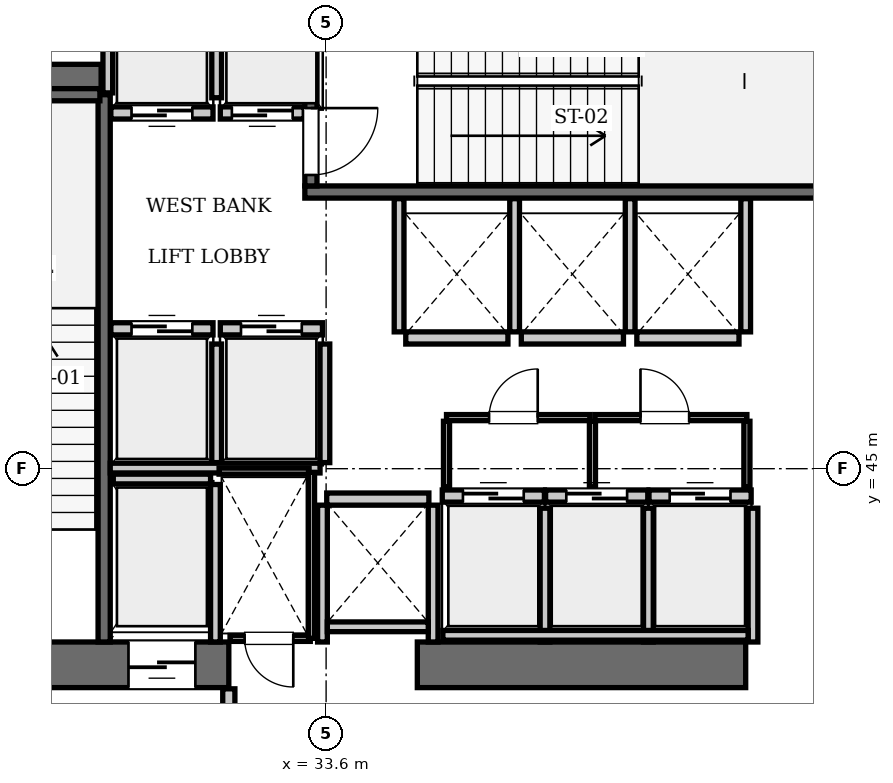
"""IFC4 building model, lengths in metres.
Left out: names, types, materials, properties, quantities, classifications, styles, units other than length and angle.
Written with IfcOpenShell. Run it as: python <this file> out.ifc"""

import sys

from ifc_helpers import new_model, si_unit, direction, frame, frame_2d, origin, place, context, subcontext, project, spatial, rectangle, extrude, element, fill, save


model = new_model("IFC4")
c1 = context("Model", 3, precision=1e-05, world=origin(), true_north=direction((0.0, 1.0)))
c2 = subcontext(c1, "Body", "Model", "MODEL_VIEW")
j1 = project(units=[si_unit("LENGTHUNIT", "METRE"), si_unit("PLANEANGLEUNIT", "RADIAN")], contexts=[c1])
p1 = place(None, origin())
s1 = spatial("IfcSite", under=j1, at=p1, CompositionType="ELEMENT")
p2 = place(p1, origin())
s2 = spatial("IfcBuilding", under=s1, at=p2, CompositionType="ELEMENT")
p3 = place(p2, frame((0.0, 0.0, 122.5)))
s3 = spatial("IfcBuildingStorey", under=s2, at=p3, CompositionType="ELEMENT", Elevation=122.5)
p4 = place(p3, frame((25.2, 41.775, 0.0), z_axis=(0.0, 0.0, 1.0), x_axis=(1.0, 0.0, 0.0)))
e1 = element("IfcWall", 1, at=p4, inside=s3, PredefinedType="SHEAR", context=c2, shape_type="SweptSolid", body=[
    extrude(rectangle(XDim=6.8, YDim=0.75, at=frame_2d((3.4, 0.0))), origin(), (0.0, 0.0, 1.0), 4.9),
])
p5 = place(p4, frame((1.65, 0.0, 0.0)))
e2 = element("IfcOpeningElement", 2, at=p5, cuts=e1, PredefinedType="OPENING", context=c2, shape_type="SweptSolid", body=[
    extrude(rectangle(XDim=1.15, YDim=2.15, at=frame_2d((0.575, 1.075))), frame((0.0, 0.385, 0.0), z_axis=(0.0, -1.0, 0.0), x_axis=(1.0, 0.0, 0.0)), (0.0, 0.0, 1.0), 0.77),
])
p6 = place(p4, frame((5.15, 0.0, 0.0)))
e3 = element("IfcOpeningElement", 3, at=p6, cuts=e1, PredefinedType="OPENING", context=c2, shape_type="SweptSolid", body=[
    extrude(rectangle(XDim=1.1, YDim=2.2, at=frame_2d((0.55, 1.1))), frame((0.0, 0.385, 0.0), z_axis=(0.0, -1.0, 0.0), x_axis=(1.0, 0.0, 0.0)), (0.0, 0.0, 1.0), 0.77),
])
p7 = place(p3, frame((35.1, 41.775, 0.0), z_axis=(0.0, 0.0, 1.0), x_axis=(1.0, 0.0, 0.0)))
e4 = element("IfcWall", 4, at=p7, inside=s3, PredefinedType="SHEAR", context=c2, shape_type="SweptSolid", body=[
    extrude(rectangle(XDim=5.4, YDim=0.75, at=frame_2d((2.7, 0.0))), origin(), (0.0, 0.0, 1.0), 4.9),
])
p8 = place(p3, frame((25.95, 51.4, 0.0), z_axis=(0.0, 0.0, 1.0), x_axis=(1.0, 0.0, 0.0)))
e5 = element("IfcWall", 5, at=p8, inside=s3, PredefinedType="SHEAR", context=c2, shape_type="SweptSolid", body=[
    extrude(rectangle(XDim=3.95, YDim=0.5, at=frame_2d((1.975, 0.0))), origin(), (0.0, 0.0, 1.0), 4.9),
])
p9 = place(p3, frame((29.95, 42.15, 0.0), z_axis=(0.0, 0.0, 1.0), x_axis=(0.0, 1.0, 0.0)))
e6 = element("IfcWall", 6, at=p9, inside=s3, PredefinedType="SOLIDWALL", context=c2, shape_type="SweptSolid", body=[
    extrude(rectangle(XDim=9.0, YDim=0.2, at=frame_2d((4.5, 0.0))), origin(), (0.0, 0.0, 1.0), 4.66),
])
p10 = place(p3, frame((26.38, 51.15, 0.0), z_axis=(0.0, 0.0, 1.0), x_axis=(1.0, 0.0, 0.0)))
e7 = element("IfcWall", 7, at=p10, inside=s3, PredefinedType="SOLIDWALL", context=c2, shape_type="SweptSolid", body=[
    extrude(rectangle(XDim=3.5, YDim=0.2, at=frame_2d((1.75, 0.0))), origin(), (0.0, 0.0, 1.0), 4.66),
])
p11 = place(p3, frame((33.25, 49.55, 0.0), z_axis=(0.0, 0.0, 1.0), x_axis=(1.0, 0.0, 0.0)))
e8 = element("IfcWall", 8, at=p11, inside=s3, PredefinedType="SOLIDWALL", context=c2, shape_type="SweptSolid", body=[
    extrude(rectangle(XDim=9.1, YDim=0.2, at=frame_2d((4.55, 0.0))), origin(), (0.0, 0.0, 1.0), 4.66),
])
p12 = place(p3, frame((33.35, 49.65, 0.0), z_axis=(0.0, 0.0, 1.0), x_axis=(0.0, 1.0, 0.0)))
e9 = element("IfcWall", 9, at=p12, inside=s3, PredefinedType="SOLIDWALL", context=c2, shape_type="SweptSolid", body=[
    extrude(rectangle(XDim=3.6, YDim=0.2, at=frame_2d((1.8, 0.0))), origin(), (0.0, 0.0, 1.0), 4.66),
])
p13 = place(p12, frame((0.18, 0.0, 0.0)))
e10 = element("IfcOpeningElement", 10, at=p13, cuts=e9, PredefinedType="OPENING", context=c2, shape_type="SweptSolid", body=[
    extrude(rectangle(XDim=1.1, YDim=2.15, at=frame_2d((0.55, 1.075))), frame((0.0, 0.11, 0.0), z_axis=(0.0, -1.0, 0.0), x_axis=(1.0, 0.0, 0.0)), (0.0, 0.0, 1.0), 0.22),
])
p14 = place(p3, frame((30.06, 47.3, 0.0), z_axis=(0.0, 0.0, 1.0), x_axis=(1.0, 0.0, 0.0)))
e11 = element("IfcWall", 11, at=p14, inside=s3, PredefinedType="SOLIDWALL", context=c2, shape_type="SweptSolid", body=[
    extrude(rectangle(XDim=1.68, YDim=0.2, at=frame_2d((0.84, 0.0))), origin(), (0.0, 0.0, 1.0), 4.66),
])
p15 = place(p14, frame((0.34, 0.0, 0.0)))
e12 = element("IfcOpeningElement", 12, at=p15, cuts=e11, PredefinedType="OPENING", context=c2, shape_type="SweptSolid", body=[
    extrude(rectangle(XDim=1.0, YDim=2.15, at=frame_2d((0.5, 1.075))), frame((0.0, 0.11, 0.0), z_axis=(0.0, -1.0, 0.0), x_axis=(1.0, 0.0, 0.0)), (0.0, 0.0, 1.0), 0.22),
])
p16 = place(p3, frame((31.86, 47.3, 0.0), z_axis=(0.0, 0.0, 1.0), x_axis=(1.0, 0.0, 0.0)))
e13 = element("IfcWall", 13, at=p16, inside=s3, PredefinedType="SOLIDWALL", context=c2, shape_type="SweptSolid", body=[
    extrude(rectangle(XDim=1.68, YDim=0.2, at=frame_2d((0.84, 0.0))), origin(), (0.0, 0.0, 1.0), 4.66),
])
p17 = place(p16, frame((0.34, 0.0, 0.0)))
e14 = element("IfcOpeningElement", 14, at=p17, cuts=e13, PredefinedType="OPENING", context=c2, shape_type="SweptSolid", body=[
    extrude(rectangle(XDim=1.0, YDim=2.15, at=frame_2d((0.5, 1.075))), frame((0.0, 0.11, 0.0), z_axis=(0.0, -1.0, 0.0), x_axis=(1.0, 0.0, 0.0)), (0.0, 0.0, 1.0), 0.22),
])
p18 = place(p3, frame((30.06, 50.85, 0.0), z_axis=(0.0, 0.0, 1.0), x_axis=(1.0, 0.0, 0.0)))
e15 = element("IfcWall", 15, at=p18, inside=s3, PredefinedType="SOLIDWALL", context=c2, shape_type="SweptSolid", body=[
    extrude(rectangle(XDim=1.68, YDim=0.2, at=frame_2d((0.84, 0.0))), origin(), (0.0, 0.0, 1.0), 4.66),
])
p19 = place(p18, frame((0.34, 0.0, 0.0)))
e16 = element("IfcOpeningElement", 16, at=p19, cuts=e15, PredefinedType="OPENING", context=c2, shape_type="SweptSolid", body=[
    extrude(rectangle(XDim=1.0, YDim=2.15, at=frame_2d((0.5, 1.075))), frame((0.0, 0.11, 0.0), z_axis=(0.0, -1.0, 0.0), x_axis=(1.0, 0.0, 0.0)), (0.0, 0.0, 1.0), 0.22),
])
p20 = place(p3, frame((31.86, 50.85, 0.0), z_axis=(0.0, 0.0, 1.0), x_axis=(1.0, 0.0, 0.0)))
e17 = element("IfcWall", 17, at=p20, inside=s3, PredefinedType="SOLIDWALL", context=c2, shape_type="SweptSolid", body=[
    extrude(rectangle(XDim=1.38, YDim=0.2, at=frame_2d((0.69, 0.0))), origin(), (0.0, 0.0, 1.0), 4.66),
])
p21 = place(p20, frame((0.19, 0.0, 0.0)))
e18 = element("IfcOpeningElement", 18, at=p21, cuts=e17, PredefinedType="OPENING", context=c2, shape_type="SweptSolid", body=[
    extrude(rectangle(XDim=1.0, YDim=2.15, at=frame_2d((0.5, 1.075))), frame((0.0, 0.11, 0.0), z_axis=(0.0, -1.0, 0.0), x_axis=(1.0, 0.0, 0.0)), (0.0, 0.0, 1.0), 0.22),
])
p22 = place(p3, frame((35.51, 44.55, 0.0), z_axis=(0.0, 0.0, 1.0), x_axis=(1.0, 0.0, 0.0)))
e19 = element("IfcWall", 19, at=p22, inside=s3, PredefinedType="SOLIDWALL", context=c2, shape_type="SweptSolid", body=[
    extrude(rectangle(XDim=1.68, YDim=0.2, at=frame_2d((0.84, 0.0))), origin(), (0.0, 0.0, 1.0), 4.66),
])
p23 = place(p22, frame((0.34, 0.0, 0.0)))
e20 = element("IfcOpeningElement", 20, at=p23, cuts=e19, PredefinedType="OPENING", context=c2, shape_type="SweptSolid", body=[
    extrude(rectangle(XDim=1.0, YDim=2.15, at=frame_2d((0.5, 1.075))), frame((0.0, 0.11, 0.0), z_axis=(0.0, -1.0, 0.0), x_axis=(1.0, 0.0, 0.0)), (0.0, 0.0, 1.0), 0.22),
])
p24 = place(p3, frame((37.21, 44.55, 0.0), z_axis=(0.0, 0.0, 1.0), x_axis=(1.0, 0.0, 0.0)))
e21 = element("IfcWall", 21, at=p24, inside=s3, PredefinedType="SOLIDWALL", context=c2, shape_type="SweptSolid", body=[
    extrude(rectangle(XDim=1.68, YDim=0.2, at=frame_2d((0.84, 0.0))), origin(), (0.0, 0.0, 1.0), 4.66),
])
p25 = place(p24, frame((0.34, 0.0, 0.0)))
e22 = element("IfcOpeningElement", 22, at=p25, cuts=e21, PredefinedType="OPENING", context=c2, shape_type="SweptSolid", body=[
    extrude(rectangle(XDim=1.0, YDim=2.15, at=frame_2d((0.5, 1.075))), frame((0.0, 0.11, 0.0), z_axis=(0.0, -1.0, 0.0), x_axis=(1.0, 0.0, 0.0)), (0.0, 0.0, 1.0), 0.22),
])
p26 = place(p3, frame((38.91, 44.55, 0.0), z_axis=(0.0, 0.0, 1.0), x_axis=(1.0, 0.0, 0.0)))
e23 = element("IfcWall", 23, at=p26, inside=s3, PredefinedType="SOLIDWALL", context=c2, shape_type="SweptSolid", body=[
    extrude(rectangle(XDim=1.68, YDim=0.2, at=frame_2d((0.84, 0.0))), origin(), (0.0, 0.0, 1.0), 4.66),
])
p27 = place(p26, frame((0.34, 0.0, 0.0)))
e24 = element("IfcOpeningElement", 24, at=p27, cuts=e23, PredefinedType="OPENING", context=c2, shape_type="SweptSolid", body=[
    extrude(rectangle(XDim=1.0, YDim=2.15, at=frame_2d((0.5, 1.075))), frame((0.0, 0.11, 0.0), z_axis=(0.0, -1.0, 0.0), x_axis=(1.0, 0.0, 0.0)), (0.0, 0.0, 1.0), 0.22),
])
p28 = place(p3, frame((34.91, 47.15, 0.0), z_axis=(0.0, 0.0, 1.0), x_axis=(1.0, 0.0, 0.0)))
e25 = element("IfcWall", 25, at=p28, inside=s3, PredefinedType="SOLIDWALL", context=c2, shape_type="SweptSolid", body=[
    extrude(rectangle(XDim=1.68, YDim=0.2, at=frame_2d((0.84, 0.0))), origin(), (0.0, 0.0, 1.0), 4.66),
])
for number, where, z_axis, x_axis in (
    (26, (36.81, 47.15, 0.0), (0.0, 0.0, 1.0), (1.0, 0.0, 0.0)),
    (27, (38.71, 47.15, 0.0), (0.0, 0.0, 1.0), (1.0, 0.0, 0.0)),
    (28, (33.61, 44.5, 0.0), (0.0, 0.0, 1.0), (1.0, 0.0, 0.0)),
):
    element("IfcWall", number, at=place(p3, frame(where, z_axis=z_axis, x_axis=x_axis)), inside=s3, PredefinedType="SOLIDWALL", context=c2, shape_type="SweptSolid", body=[
        extrude(rectangle(XDim=1.68, YDim=0.2, at=frame_2d((0.84, 0.0))), origin(), (0.0, 0.0, 1.0), 4.66),
    ])
p29 = place(p3, frame((30.1, 44.83, 0.0), z_axis=(0.0, 0.0, 1.0), x_axis=(1.0, 0.0, 0.0)))
e29 = element("IfcWall", 29, at=p29, inside=s3, PredefinedType="SOLIDWALL", context=c2, shape_type="SweptSolid", body=[
    extrude(rectangle(XDim=1.6, YDim=0.16, at=frame_2d((0.8, 0.0))), origin(), (0.0, 0.0, 1.0), 4.66),
])
p30 = place(p3, frame((31.78, 42.15, 0.0), z_axis=(0.0, 0.0, 1.0), x_axis=(0.0, 1.0, 0.0)))
e30 = element("IfcWall", 30, at=p30, inside=s3, PredefinedType="SOLIDWALL", context=c2, shape_type="SweptSolid", body=[
    extrude(rectangle(XDim=2.59, YDim=0.16, at=frame_2d((1.295, 0.0))), origin(), (0.0, 0.0, 1.0), 4.66),
])
for number, where, z_axis, x_axis in (
    (31, (31.8, 45.1, 0.0), (0.0, 0.0, 1.0), (0.0, 1.0, 0.0)),
    (32, (33.58, 45.1, 0.0), (0.0, 0.0, 1.0), (0.0, 1.0, 0.0)),
):
    element("IfcWall", number, at=place(p3, frame(where, z_axis=z_axis, x_axis=x_axis)), inside=s3, PredefinedType="SOLIDWALL", context=c2, shape_type="SweptSolid", body=[
        extrude(rectangle(XDim=1.95, YDim=0.16, at=frame_2d((0.975, 0.0))), origin(), (0.0, 0.0, 1.0), 4.66),
    ])
p31 = place(p3, frame((30.05, 45.01, 0.0), z_axis=(0.0, 0.0, 1.0), x_axis=(1.0, 0.0, 0.0)))
e33 = element("IfcWall", 33, at=p31, inside=s3, PredefinedType="SOLIDWALL", context=c2, shape_type="SweptSolid", body=[
    extrude(rectangle(XDim=3.45, YDim=0.16, at=frame_2d((1.725, 0.0))), origin(), (0.0, 0.0, 1.0), 4.66),
])
p32 = place(p3, frame((30.01, 51.18, 0.0), z_axis=(0.0, 0.0, 1.0), x_axis=(0.0, 1.0, 0.0)))
e34 = element("IfcWall", 34, at=p32, inside=s3, PredefinedType="SOLIDWALL", context=c2, shape_type="SweptSolid", body=[
    extrude(rectangle(XDim=2.07, YDim=0.16, at=frame_2d((1.035, 0.0))), origin(), (0.0, 0.0, 1.0), 4.66),
])
p33 = place(p3, frame((31.8, 51.1, 0.0), z_axis=(0.0, 0.0, 1.0), x_axis=(0.0, 1.0, 0.0)))
e35 = element("IfcWall", 35, at=p33, inside=s3, PredefinedType="SOLIDWALL", context=c2, shape_type="SweptSolid", body=[
    extrude(rectangle(XDim=2.15, YDim=0.16, at=frame_2d((1.075, 0.0))), origin(), (0.0, 0.0, 1.0), 4.66),
])
for number, where, z_axis, x_axis in (
    (36, (37.2, 42.15, 0.0), (0.0, 0.0, 1.0), (0.0, 1.0, 0.0)),
    (37, (38.9, 42.15, 0.0), (0.0, 0.0, 1.0), (0.0, 1.0, 0.0)),
    (38, (40.62, 42.15, 0.0), (0.0, 0.0, 1.0), (0.0, 1.0, 0.0)),
):
    element("IfcWall", number, at=place(p3, frame(where, z_axis=z_axis, x_axis=x_axis)), inside=s3, PredefinedType="SOLIDWALL", context=c2, shape_type="SweptSolid", body=[
        extrude(rectangle(XDim=2.2, YDim=0.16, at=frame_2d((1.1, 0.0))), origin(), (0.0, 0.0, 1.0), 4.66),
    ])
p34 = place(p3, frame((35.52, 42.26, 0.0), z_axis=(0.0, 0.0, 1.0), x_axis=(1.0, 0.0, 0.0)))
e39 = element("IfcWall", 39, at=p34, inside=s3, PredefinedType="SOLIDWALL", context=c2, shape_type="SweptSolid", body=[
    extrude(rectangle(XDim=5.02, YDim=0.16, at=frame_2d((2.51, 0.0))), origin(), (0.0, 0.0, 1.0), 4.66),
])
for number, where, z_axis, x_axis in (
    (40, (34.8, 47.25, 0.0), (0.0, 0.0, 1.0), (0.0, 1.0, 0.0)),
    (41, (36.7, 47.25, 0.0), (0.0, 0.0, 1.0), (0.0, 1.0, 0.0)),
    (42, (38.6, 47.25, 0.0), (0.0, 0.0, 1.0), (0.0, 1.0, 0.0)),
    (43, (40.5, 47.25, 0.0), (0.0, 0.0, 1.0), (0.0, 1.0, 0.0)),
):
    element("IfcWall", number, at=place(p3, frame(where, z_axis=z_axis, x_axis=x_axis)), inside=s3, PredefinedType="SOLIDWALL", context=c2, shape_type="SweptSolid", body=[
        extrude(rectangle(XDim=2.19, YDim=0.16, at=frame_2d((1.095, 0.0))), origin(), (0.0, 0.0, 1.0), 4.66),
    ])
for number, where, z_axis, x_axis in (
    (44, (33.54, 42.15, 0.0), (0.0, 0.0, 1.0), (0.0, 1.0, 0.0)),
    (45, (35.36, 42.15, 0.0), (0.0, 0.0, 1.0), (0.0, 1.0, 0.0)),
):
    element("IfcWall", number, at=place(p3, frame(where, z_axis=z_axis, x_axis=x_axis)), inside=s3, PredefinedType="SOLIDWALL", context=c2, shape_type="SweptSolid", body=[
        extrude(rectangle(XDim=2.25, YDim=0.16, at=frame_2d((1.125, 0.0))), origin(), (0.0, 0.0, 1.0), 4.66),
    ])
p35 = place(p3, frame((33.62, 42.4, 0.0), z_axis=(0.0, 0.0, 1.0), x_axis=(1.0, 0.0, 0.0)))
e46 = element("IfcWall", 46, at=p35, inside=s3, PredefinedType="SOLIDWALL", context=c2, shape_type="SweptSolid", body=[
    extrude(rectangle(XDim=1.66, YDim=0.16, at=frame_2d((0.83, 0.0))), origin(), (0.0, 0.0, 1.0), 4.66),
])
p36 = place(p3, frame((32.0, 38.31, 0.0), z_axis=(0.0, 0.0, 1.0), x_axis=(0.0, 1.0, 0.0)))
e47 = element("IfcWall", 47, at=p36, inside=s3, PredefinedType="PARTITIONING", context=c2, shape_type="SweptSolid", body=[
    extrude(rectangle(XDim=3.07, YDim=0.2, at=frame_2d((1.535, 0.0))), origin(), (0.0, 0.0, 1.0), 4.66),
])
p37 = place(p3, frame((32.02, 42.21, 0.0), z_axis=(0.0, 0.0, 1.0), x_axis=(1.0, 0.0, 0.0)))
e48 = element("IfcWall", 48, at=p37, inside=s3, PredefinedType="PARTITIONING", context=c2, shape_type="SweptSolid", body=[
    extrude(rectangle(XDim=1.32, YDim=0.1, at=frame_2d((0.66, 0.0))), origin(), (0.0, 0.0, 1.0), 4.66),
])
p38 = place(p37, frame((0.24, 0.0, 0.0)))
e49 = element("IfcOpeningElement", 49, at=p38, cuts=e48, PredefinedType="OPENING", context=c2, shape_type="SweptSolid", body=[
    extrude(rectangle(XDim=0.8, YDim=2.05, at=frame_2d((0.4, 1.025))), frame((0.0, 0.06, 0.0), z_axis=(0.0, -1.0, 0.0), x_axis=(1.0, 0.0, 0.0)), (0.0, 0.0, 1.0), 0.12),
])
p39 = place(p3, frame((31.84, 44.96, 0.0), z_axis=(0.0, 0.0, 1.0), x_axis=(1.0, 0.0, 0.0)))
e50 = element("IfcWall", 50, at=p39, inside=s3, PredefinedType="PARTITIONING", context=c2, shape_type="SweptSolid", body=[
    extrude(rectangle(XDim=1.48, YDim=0.1, at=frame_2d((0.74, 0.0))), origin(), (0.0, 0.0, 1.0), 4.66),
])
p40 = place(p3, frame((33.36, 42.21, 0.0), z_axis=(0.0, 0.0, 1.0), x_axis=(0.0, 1.0, 0.0)))
e51 = element("IfcWall", 51, at=p40, inside=s3, PredefinedType="PARTITIONING", context=c2, shape_type="SweptSolid", body=[
    extrude(rectangle(XDim=2.73, YDim=0.1, at=frame_2d((1.365, 0.0))), origin(), (0.0, 0.0, 1.0), 4.66),
])
p41 = place(p3, frame((35.58, 45.84, 0.0), z_axis=(0.0, 0.0, 1.0), x_axis=(1.0, 0.0, 0.0)))
e52 = element("IfcWall", 52, at=p41, inside=s3, PredefinedType="PARTITIONING", context=c2, shape_type="SweptSolid", body=[
    extrude(rectangle(XDim=2.36, YDim=0.1, at=frame_2d((1.18, 0.0))), origin(), (0.0, 0.0, 1.0), 4.66),
])
p42 = place(p41, frame((0.7, 0.0, 0.0)))
e53 = element("IfcOpeningElement", 53, at=p42, cuts=e52, PredefinedType="OPENING", context=c2, shape_type="SweptSolid", body=[
    extrude(rectangle(XDim=0.8, YDim=2.05, at=frame_2d((0.4, 1.025))), frame((0.0, 0.06, 0.0), z_axis=(0.0, -1.0, 0.0), x_axis=(1.0, 0.0, 0.0)), (0.0, 0.0, 1.0), 0.12),
])
p43 = place(p3, frame((38.02, 45.84, 0.0), z_axis=(0.0, 0.0, 1.0), x_axis=(1.0, 0.0, 0.0)))
e54 = element("IfcWall", 54, at=p43, inside=s3, PredefinedType="PARTITIONING", context=c2, shape_type="SweptSolid", body=[
    extrude(rectangle(XDim=2.5, YDim=0.1, at=frame_2d((1.25, 0.0))), origin(), (0.0, 0.0, 1.0), 4.66),
])
p44 = place(p43, frame((0.75, 0.0, 0.0)))
e55 = element("IfcOpeningElement", 55, at=p44, cuts=e54, PredefinedType="OPENING", context=c2, shape_type="SweptSolid", body=[
    extrude(rectangle(XDim=0.8, YDim=2.05, at=frame_2d((0.4, 1.025))), frame((0.0, 0.06, 0.0), z_axis=(0.0, -1.0, 0.0), x_axis=(1.0, 0.0, 0.0)), (0.0, 0.0, 1.0), 0.12),
])
for number, where, z_axis, x_axis in (
    (56, (35.58, 44.7, 0.0), (0.0, 0.0, 1.0), (0.0, 1.0, 0.0)),
    (57, (37.98, 44.7, 0.0), (0.0, 0.0, 1.0), (0.0, 1.0, 0.0)),
    (58, (40.52, 44.7, 0.0), (0.0, 0.0, 1.0), (0.0, 1.0, 0.0)),
):
    element("IfcWall", number, at=place(p3, frame(where, z_axis=z_axis, x_axis=x_axis)), inside=s3, PredefinedType="PARTITIONING", context=c2, shape_type="SweptSolid", body=[
        extrude(rectangle(XDim=1.08, YDim=0.1, at=frame_2d((0.54, 0.0))), origin(), (0.0, 0.0, 1.0), 4.66),
    ])
p45 = place(p13, frame((1.1, 0.0, 0.0), z_axis=(0.0, 0.0, 1.0), x_axis=(-1.0, 0.0, 0.0)))
e59 = element("IfcDoor", 59, at=p45, inside=s3, OperationType="SINGLE_SWING_LEFT", PredefinedType="DOOR", context=c2, shape_type="SweptSolid", body=[
    extrude(rectangle(XDim=1.1, YDim=2.15, at=frame_2d((0.55, 1.075))), frame((0.0, 0.025, 0.0), z_axis=(0.0, -1.0, 0.0), x_axis=(1.0, 0.0, 0.0)), (0.0, 0.0, 1.0), 0.05),
])
fill(e10, e59)
p46 = place(p15, origin())
e60 = element("IfcDoor", 60, at=p46, inside=s3, OperationType="SLIDING_TO_LEFT", PredefinedType="DOOR", context=c2, shape_type="SweptSolid", body=[
    extrude(rectangle(XDim=1.0, YDim=2.15, at=frame_2d((0.5, 1.075))), frame((0.0, 0.025, 0.0), z_axis=(0.0, -1.0, 0.0), x_axis=(1.0, 0.0, 0.0)), (0.0, 0.0, 1.0), 0.05),
])
fill(e12, e60)
p47 = place(p17, origin())
e61 = element("IfcDoor", 61, at=p47, inside=s3, OperationType="SLIDING_TO_LEFT", PredefinedType="DOOR", context=c2, shape_type="SweptSolid", body=[
    extrude(rectangle(XDim=1.0, YDim=2.15, at=frame_2d((0.5, 1.075))), frame((0.0, 0.025, 0.0), z_axis=(0.0, -1.0, 0.0), x_axis=(1.0, 0.0, 0.0)), (0.0, 0.0, 1.0), 0.05),
])
fill(e14, e61)
p48 = place(p19, frame((1.0, 0.0, 0.0), z_axis=(0.0, 0.0, 1.0), x_axis=(-1.0, 0.0, 0.0)))
e62 = element("IfcDoor", 62, at=p48, inside=s3, OperationType="SLIDING_TO_LEFT", PredefinedType="DOOR", context=c2, shape_type="SweptSolid", body=[
    extrude(rectangle(XDim=1.0, YDim=2.15, at=frame_2d((0.5, 1.075))), frame((0.0, 0.025, 0.0), z_axis=(0.0, -1.0, 0.0), x_axis=(1.0, 0.0, 0.0)), (0.0, 0.0, 1.0), 0.05),
])
fill(e16, e62)
p49 = place(p21, frame((1.0, 0.0, 0.0), z_axis=(0.0, 0.0, 1.0), x_axis=(-1.0, 0.0, 0.0)))
e63 = element("IfcDoor", 63, at=p49, inside=s3, OperationType="SLIDING_TO_LEFT", PredefinedType="DOOR", context=c2, shape_type="SweptSolid", body=[
    extrude(rectangle(XDim=1.0, YDim=2.15, at=frame_2d((0.5, 1.075))), frame((0.0, 0.025, 0.0), z_axis=(0.0, -1.0, 0.0), x_axis=(1.0, 0.0, 0.0)), (0.0, 0.0, 1.0), 0.05),
])
fill(e18, e63)
p50 = place(p23, origin())
e64 = element("IfcDoor", 64, at=p50, inside=s3, OperationType="SLIDING_TO_LEFT", PredefinedType="DOOR", context=c2, shape_type="SweptSolid", body=[
    extrude(rectangle(XDim=1.0, YDim=2.15, at=frame_2d((0.5, 1.075))), frame((0.0, 0.025, 0.0), z_axis=(0.0, -1.0, 0.0), x_axis=(1.0, 0.0, 0.0)), (0.0, 0.0, 1.0), 0.05),
])
fill(e20, e64)
p51 = place(p25, origin())
e65 = element("IfcDoor", 65, at=p51, inside=s3, OperationType="SLIDING_TO_LEFT", PredefinedType="DOOR", context=c2, shape_type="SweptSolid", body=[
    extrude(rectangle(XDim=1.0, YDim=2.15, at=frame_2d((0.5, 1.075))), frame((0.0, 0.025, 0.0), z_axis=(0.0, -1.0, 0.0), x_axis=(1.0, 0.0, 0.0)), (0.0, 0.0, 1.0), 0.05),
])
fill(e22, e65)
p52 = place(p27, origin())
e66 = element("IfcDoor", 66, at=p52, inside=s3, OperationType="SLIDING_TO_LEFT", PredefinedType="DOOR", context=c2, shape_type="SweptSolid", body=[
    extrude(rectangle(XDim=1.0, YDim=2.15, at=frame_2d((0.5, 1.075))), frame((0.0, 0.025, 0.0), z_axis=(0.0, -1.0, 0.0), x_axis=(1.0, 0.0, 0.0)), (0.0, 0.0, 1.0), 0.05),
])
fill(e24, e66)
p53 = place(p6, frame((1.1, 0.0, 0.0), z_axis=(0.0, 0.0, 1.0), x_axis=(-1.0, 0.0, 0.0)))
e67 = element("IfcDoor", 67, at=p53, inside=s3, OperationType="SLIDING_TO_LEFT", PredefinedType="DOOR", context=c2, shape_type="SweptSolid", body=[
    extrude(rectangle(XDim=1.1, YDim=2.2, at=frame_2d((0.55, 1.1))), frame((0.0, 0.025, 0.0), z_axis=(0.0, -1.0, 0.0), x_axis=(1.0, 0.0, 0.0)), (0.0, 0.0, 1.0), 0.05),
])
fill(e3, e67)
p54 = place(p38, frame((0.8, 0.0, 0.0), z_axis=(0.0, 0.0, 1.0), x_axis=(-1.0, 0.0, 0.0)))
e68 = element("IfcDoor", 68, at=p54, inside=s3, OperationType="SINGLE_SWING_LEFT", PredefinedType="DOOR", context=c2, shape_type="SweptSolid", body=[
    extrude(rectangle(XDim=0.8, YDim=2.05, at=frame_2d((0.4, 1.025))), frame((0.0, 0.025, 0.0), z_axis=(0.0, -1.0, 0.0), x_axis=(1.0, 0.0, 0.0)), (0.0, 0.0, 1.0), 0.05),
])
fill(e49, e68)
p55 = place(p42, origin())
e69 = element("IfcDoor", 69, at=p55, inside=s3, OperationType="SINGLE_SWING_RIGHT", PredefinedType="DOOR", context=c2, shape_type="SweptSolid", body=[
    extrude(rectangle(XDim=0.8, YDim=2.05, at=frame_2d((0.4, 1.025))), frame((0.0, 0.025, 0.0), z_axis=(0.0, -1.0, 0.0), x_axis=(1.0, 0.0, 0.0)), (0.0, 0.0, 1.0), 0.05),
])
fill(e53, e69)
p56 = place(p44, origin())
e70 = element("IfcDoor", 70, at=p56, inside=s3, OperationType="SINGLE_SWING_LEFT", PredefinedType="DOOR", context=c2, shape_type="SweptSolid", body=[
    extrude(rectangle(XDim=0.8, YDim=2.05, at=frame_2d((0.4, 1.025))), frame((0.0, 0.025, 0.0), z_axis=(0.0, -1.0, 0.0), x_axis=(1.0, 0.0, 0.0)), (0.0, 0.0, 1.0), 0.05),
])
fill(e55, e70)
save(model, sys.argv[1])
